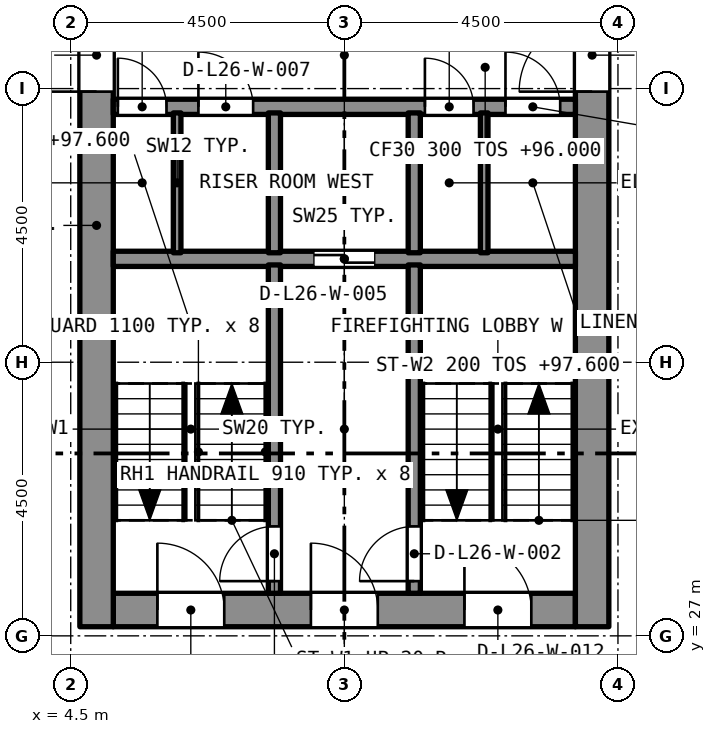
"""IFC4 building model, lengths in metres.
Left out: names, types, materials, properties, quantities, classifications, styles, units other than length and angle.
Written with IfcOpenShell. Run it as: python <this file> out.ifc"""

import sys

from ifc_helpers import new_model, si_unit, direction, frame, frame_2d, origin, place, context, subcontext, project, spatial, rectangle, extrude, element, fill, save


model = new_model("IFC4")
c1 = context("Model", 3, precision=1e-05, world=origin(), true_north=direction((0.0, 1.0)))
c2 = subcontext(c1, "Body", "Model", "MODEL_VIEW")
j1 = project(units=[si_unit("LENGTHUNIT", "METRE"), si_unit("PLANEANGLEUNIT", "RADIAN")], contexts=[c1])
p1 = place(None, origin())
s1 = spatial("IfcSite", under=j1, at=p1, CompositionType="ELEMENT")
p2 = place(p1, origin())
s2 = spatial("IfcBuilding", under=s1, at=p2, CompositionType="ELEMENT")
p3 = place(p2, frame((0.0, 0.0, 96.0)))
s3 = spatial("IfcBuildingStorey", under=s2, at=p3, CompositionType="ELEMENT", Elevation=96.0)
p4 = place(p3, frame((5.2, 27.425, 0.0), z_axis=(0.0, 0.0, 1.0), x_axis=(1.0, 0.0, 0.0)))
e1 = element("IfcWall", 1, at=p4, inside=s3, PredefinedType="SOLIDWALL", context=c2, shape_type="SweptSolid", body=[
    extrude(rectangle(XDim=7.6, YDim=0.55, at=frame_2d((3.8, 0.0))), origin(), (0.0, 0.0, 1.0), 3.2),
])
p5 = place(p4, frame((0.725, 0.0, 0.0)))
e2 = element("IfcOpeningElement", 2, at=p5, cuts=e1, PredefinedType="OPENING", context=c2, shape_type="SweptSolid", body=[
    extrude(rectangle(XDim=1.1, YDim=2.1, at=frame_2d((0.55, 1.05))), frame((0.0, 0.285, 0.0), z_axis=(0.0, -1.0, 0.0), x_axis=(1.0, 0.0, 0.0)), (0.0, 0.0, 1.0), 0.57),
])
p6 = place(p4, frame((3.25, 0.0, 0.0)))
e3 = element("IfcOpeningElement", 3, at=p6, cuts=e1, PredefinedType="OPENING", context=c2, shape_type="SweptSolid", body=[
    extrude(rectangle(XDim=1.1, YDim=2.1, at=frame_2d((0.55, 1.05))), frame((0.0, 0.285, 0.0), z_axis=(0.0, -1.0, 0.0), x_axis=(1.0, 0.0, 0.0)), (0.0, 0.0, 1.0), 0.57),
])
p7 = place(p4, frame((5.775, 0.0, 0.0)))
e4 = element("IfcOpeningElement", 4, at=p7, cuts=e1, PredefinedType="OPENING", context=c2, shape_type="SweptSolid", body=[
    extrude(rectangle(XDim=1.1, YDim=2.1, at=frame_2d((0.55, 1.05))), frame((0.0, 0.285, 0.0), z_axis=(0.0, -1.0, 0.0), x_axis=(1.0, 0.0, 0.0)), (0.0, 0.0, 1.0), 0.57),
])
p8 = place(p3, frame((4.925, 27.15, 0.0), z_axis=(0.0, 0.0, 1.0), x_axis=(0.0, 1.0, 0.0)))
e5 = element("IfcWall", 5, at=p8, inside=s3, PredefinedType="SOLIDWALL", context=c2, shape_type="SweptSolid", body=[
    extrude(rectangle(XDim=13.2, YDim=0.55, at=frame_2d((6.6, 0.0))), origin(), (0.0, 0.0, 1.0), 3.2),
])
p9 = place(p8, frame((8.8, 0.0, 0.0)))
e6 = element("IfcOpeningElement", 6, at=p9, cuts=e5, PredefinedType="OPENING", context=c2, shape_type="SweptSolid", body=[
    extrude(rectangle(XDim=1.2, YDim=2.1, at=frame_2d((0.6, 1.05))), frame((0.0, 0.285, 0.0), z_axis=(0.0, -1.0, 0.0), x_axis=(1.0, 0.0, 0.0)), (0.0, 0.0, 1.0), 0.57),
])
p10 = place(p3, frame((13.075, 27.15, 0.0), z_axis=(0.0, 0.0, 1.0), x_axis=(0.0, 1.0, 0.0)))
e7 = element("IfcWall", 7, at=p10, inside=s3, PredefinedType="SOLIDWALL", context=c2, shape_type="SweptSolid", body=[
    extrude(rectangle(XDim=13.2, YDim=0.55, at=frame_2d((6.6, 0.0))), origin(), (0.0, 0.0, 1.0), 3.2),
])
p11 = place(p10, frame((10.95, 0.0, 0.0)))
e8 = element("IfcOpeningElement", 8, at=p11, cuts=e7, PredefinedType="OPENING", context=c2, shape_type="SweptSolid", body=[
    extrude(rectangle(XDim=1.1, YDim=2.1, at=frame_2d((0.55, 1.05))), frame((0.0, 0.285, 0.0), z_axis=(0.0, -1.0, 0.0), x_axis=(1.0, 0.0, 0.0)), (0.0, 0.0, 1.0), 0.57),
])
p12 = place(p10, frame((8.8, 0.0, 0.0)))
e9 = element("IfcOpeningElement", 9, at=p12, cuts=e7, PredefinedType="OPENING", context=c2, shape_type="SweptSolid", body=[
    extrude(rectangle(XDim=1.2, YDim=2.1, at=frame_2d((0.6, 1.05))), frame((0.0, 0.285, 0.0), z_axis=(0.0, -1.0, 0.0), x_axis=(1.0, 0.0, 0.0)), (0.0, 0.0, 1.0), 0.57),
])
p13 = place(p3, frame((5.2, 33.2, 0.0), z_axis=(0.0, 0.0, 1.0), x_axis=(1.0, 0.0, 0.0)))
e10 = element("IfcWall", 10, at=p13, inside=s3, PredefinedType="SOLIDWALL", context=c2, shape_type="SweptSolid", body=[
    extrude(rectangle(XDim=7.6, YDim=0.25, at=frame_2d((3.8, 0.0))), origin(), (0.0, 0.0, 1.0), 2.9),
])
p14 = place(p13, frame((3.3, 0.0, 0.0)))
e11 = element("IfcOpeningElement", 11, at=p14, cuts=e10, PredefinedType="OPENING", context=c2, shape_type="SweptSolid", body=[
    extrude(rectangle(XDim=1.0, YDim=2.1, at=frame_2d((0.5, 1.05))), frame((0.0, 0.135, 0.0), z_axis=(0.0, -1.0, 0.0), x_axis=(1.0, 0.0, 0.0)), (0.0, 0.0, 1.0), 0.27),
])
p15 = place(p3, frame((5.2, 35.7, 0.0), z_axis=(0.0, 0.0, 1.0), x_axis=(1.0, 0.0, 0.0)))
e12 = element("IfcWall", 12, at=p15, inside=s3, PredefinedType="SOLIDWALL", context=c2, shape_type="SweptSolid", body=[
    extrude(rectangle(XDim=7.6, YDim=0.25, at=frame_2d((3.8, 0.0))), origin(), (0.0, 0.0, 1.0), 2.9),
])
p16 = place(p15, frame((0.075, 0.0, 0.0)))
e13 = element("IfcOpeningElement", 13, at=p16, cuts=e12, PredefinedType="OPENING", context=c2, shape_type="SweptSolid", body=[
    extrude(rectangle(XDim=0.8, YDim=2.1, at=frame_2d((0.4, 1.05))), frame((0.0, 0.135, 0.0), z_axis=(0.0, -1.0, 0.0), x_axis=(1.0, 0.0, 0.0)), (0.0, 0.0, 1.0), 0.27),
])
p17 = place(p15, frame((1.4, 0.0, 0.0)))
e14 = element("IfcOpeningElement", 14, at=p17, cuts=e12, PredefinedType="OPENING", context=c2, shape_type="SweptSolid", body=[
    extrude(rectangle(XDim=0.9, YDim=2.1, at=frame_2d((0.45, 1.05))), frame((0.0, 0.135, 0.0), z_axis=(0.0, -1.0, 0.0), x_axis=(1.0, 0.0, 0.0)), (0.0, 0.0, 1.0), 0.27),
])
p18 = place(p15, frame((5.125, 0.0, 0.0)))
e15 = element("IfcOpeningElement", 15, at=p18, cuts=e12, PredefinedType="OPENING", context=c2, shape_type="SweptSolid", body=[
    extrude(rectangle(XDim=0.8, YDim=2.1, at=frame_2d((0.4, 1.05))), frame((0.0, 0.135, 0.0), z_axis=(0.0, -1.0, 0.0), x_axis=(1.0, 0.0, 0.0)), (0.0, 0.0, 1.0), 0.27),
])
p19 = place(p15, frame((6.45, 0.0, 0.0)))
e16 = element("IfcOpeningElement", 16, at=p19, cuts=e12, PredefinedType="OPENING", context=c2, shape_type="SweptSolid", body=[
    extrude(rectangle(XDim=0.9, YDim=2.1, at=frame_2d((0.45, 1.05))), frame((0.0, 0.135, 0.0), z_axis=(0.0, -1.0, 0.0), x_axis=(1.0, 0.0, 0.0)), (0.0, 0.0, 1.0), 0.27),
])
p20 = place(p3, frame((7.85, 27.7, 0.0), z_axis=(0.0, 0.0, 1.0), x_axis=(0.0, 1.0, 0.0)))
e17 = element("IfcWall", 17, at=p20, inside=s3, PredefinedType="SOLIDWALL", context=c2, shape_type="SweptSolid", body=[
    extrude(rectangle(XDim=5.4, YDim=0.2, at=frame_2d((2.7, 0.0))), origin(), (0.0, 0.0, 1.0), 2.9),
])
p21 = place(p20, frame((0.2, 0.0, 0.0)))
e18 = element("IfcOpeningElement", 18, at=p21, cuts=e17, PredefinedType="OPENING", context=c2, shape_type="SweptSolid", body=[
    extrude(rectangle(XDim=0.9, YDim=2.1, at=frame_2d((0.45, 1.05))), frame((0.0, 0.11, 0.0), z_axis=(0.0, -1.0, 0.0), x_axis=(1.0, 0.0, 0.0)), (0.0, 0.0, 1.0), 0.22),
])
p22 = place(p3, frame((10.15, 27.7, 0.0), z_axis=(0.0, 0.0, 1.0), x_axis=(0.0, 1.0, 0.0)))
e19 = element("IfcWall", 19, at=p22, inside=s3, PredefinedType="SOLIDWALL", context=c2, shape_type="SweptSolid", body=[
    extrude(rectangle(XDim=5.4, YDim=0.2, at=frame_2d((2.7, 0.0))), origin(), (0.0, 0.0, 1.0), 2.9),
])
p23 = place(p22, frame((0.2, 0.0, 0.0)))
e20 = element("IfcOpeningElement", 20, at=p23, cuts=e19, PredefinedType="OPENING", context=c2, shape_type="SweptSolid", body=[
    extrude(rectangle(XDim=0.9, YDim=2.1, at=frame_2d((0.45, 1.05))), frame((0.0, 0.11, 0.0), z_axis=(0.0, -1.0, 0.0), x_axis=(1.0, 0.0, 0.0)), (0.0, 0.0, 1.0), 0.22),
])
for number, where, z_axis, x_axis in (
    (21, (7.85, 33.3, 0.0), (0.0, 0.0, 1.0), (0.0, 1.0, 0.0)),
    (22, (10.15, 33.3, 0.0), (0.0, 0.0, 1.0), (0.0, 1.0, 0.0)),
):
    element("IfcWall", number, at=place(p3, frame(where, z_axis=z_axis, x_axis=x_axis)), inside=s3, PredefinedType="SOLIDWALL", context=c2, shape_type="SweptSolid", body=[
        extrude(rectangle(XDim=2.3, YDim=0.2, at=frame_2d((1.15, 0.0))), origin(), (0.0, 0.0, 1.0), 2.9),
    ])
for number, where, z_axis, x_axis in (
    (23, (6.25, 33.3, 0.0), (0.0, 0.0, 1.0), (0.0, 1.0, 0.0)),
    (24, (11.3, 33.3, 0.0), (0.0, 0.0, 1.0), (0.0, 1.0, 0.0)),
):
    element("IfcWall", number, at=place(p3, frame(where, z_axis=z_axis, x_axis=x_axis)), inside=s3, PredefinedType="PARTITIONING", context=c2, shape_type="SweptSolid", body=[
        extrude(rectangle(XDim=2.3, YDim=0.125, at=frame_2d((1.15, 0.0))), origin(), (0.0, 0.0, 1.0), 2.9),
    ])
p24 = place(p21, origin())
e25 = element("IfcDoor", 25, at=p24, inside=s3, OperationType="SINGLE_SWING_LEFT", PredefinedType="DOOR", context=c2, shape_type="SweptSolid", body=[
    extrude(rectangle(XDim=0.9, YDim=2.1, at=frame_2d((0.45, 1.05))), frame((0.0, 0.025, 0.0), z_axis=(0.0, -1.0, 0.0), x_axis=(1.0, 0.0, 0.0)), (0.0, 0.0, 1.0), 0.05),
])
fill(e18, e25)
p25 = place(p23, origin())
e26 = element("IfcDoor", 26, at=p25, inside=s3, OperationType="SINGLE_SWING_LEFT", PredefinedType="DOOR", context=c2, shape_type="SweptSolid", body=[
    extrude(rectangle(XDim=0.9, YDim=2.1, at=frame_2d((0.45, 1.05))), frame((0.0, 0.025, 0.0), z_axis=(0.0, -1.0, 0.0), x_axis=(1.0, 0.0, 0.0)), (0.0, 0.0, 1.0), 0.05),
])
fill(e20, e26)
p26 = place(p14, origin())
e27 = element("IfcDoor", 27, at=p26, inside=s3, OperationType="SLIDING_TO_LEFT", PredefinedType="DOOR", context=c2, shape_type="SweptSolid", body=[
    extrude(rectangle(XDim=1.0, YDim=2.1, at=frame_2d((0.5, 1.05))), frame((0.0, 0.025, 0.0), z_axis=(0.0, -1.0, 0.0), x_axis=(1.0, 0.0, 0.0)), (0.0, 0.0, 1.0), 0.05),
])
fill(e11, e27)
p27 = place(p16, origin())
e28 = element("IfcDoor", 28, at=p27, inside=s3, OperationType="SINGLE_SWING_LEFT", PredefinedType="DOOR", context=c2, shape_type="SweptSolid", body=[
    extrude(rectangle(XDim=0.8, YDim=2.1, at=frame_2d((0.4, 1.05))), frame((0.0, 0.025, 0.0), z_axis=(0.0, -1.0, 0.0), x_axis=(1.0, 0.0, 0.0)), (0.0, 0.0, 1.0), 0.05),
])
fill(e13, e28)
p28 = place(p17, origin())
e29 = element("IfcDoor", 29, at=p28, inside=s3, OperationType="SINGLE_SWING_LEFT", PredefinedType="DOOR", context=c2, shape_type="SweptSolid", body=[
    extrude(rectangle(XDim=0.9, YDim=2.1, at=frame_2d((0.45, 1.05))), frame((0.0, 0.025, 0.0), z_axis=(0.0, -1.0, 0.0), x_axis=(1.0, 0.0, 0.0)), (0.0, 0.0, 1.0), 0.05),
])
fill(e14, e29)
p29 = place(p18, origin())
e30 = element("IfcDoor", 30, at=p29, inside=s3, OperationType="SINGLE_SWING_LEFT", PredefinedType="DOOR", context=c2, shape_type="SweptSolid", body=[
    extrude(rectangle(XDim=0.8, YDim=2.1, at=frame_2d((0.4, 1.05))), frame((0.0, 0.025, 0.0), z_axis=(0.0, -1.0, 0.0), x_axis=(1.0, 0.0, 0.0)), (0.0, 0.0, 1.0), 0.05),
])
fill(e15, e30)
p30 = place(p19, origin())
e31 = element("IfcDoor", 31, at=p30, inside=s3, OperationType="SINGLE_SWING_LEFT", PredefinedType="DOOR", context=c2, shape_type="SweptSolid", body=[
    extrude(rectangle(XDim=0.9, YDim=2.1, at=frame_2d((0.45, 1.05))), frame((0.0, 0.025, 0.0), z_axis=(0.0, -1.0, 0.0), x_axis=(1.0, 0.0, 0.0)), (0.0, 0.0, 1.0), 0.05),
])
fill(e16, e31)
p31 = place(p5, origin())
e32 = element("IfcDoor", 32, at=p31, inside=s3, OperationType="SINGLE_SWING_LEFT", PredefinedType="DOOR", context=c2, shape_type="SweptSolid", body=[
    extrude(rectangle(XDim=1.1, YDim=2.1, at=frame_2d((0.55, 1.05))), frame((0.0, 0.025, 0.0), z_axis=(0.0, -1.0, 0.0), x_axis=(1.0, 0.0, 0.0)), (0.0, 0.0, 1.0), 0.05),
])
fill(e2, e32)
p32 = place(p6, origin())
e33 = element("IfcDoor", 33, at=p32, inside=s3, OperationType="SINGLE_SWING_LEFT", PredefinedType="DOOR", context=c2, shape_type="SweptSolid", body=[
    extrude(rectangle(XDim=1.1, YDim=2.1, at=frame_2d((0.55, 1.05))), frame((0.0, 0.025, 0.0), z_axis=(0.0, -1.0, 0.0), x_axis=(1.0, 0.0, 0.0)), (0.0, 0.0, 1.0), 0.05),
])
fill(e3, e33)
p33 = place(p7, origin())
e34 = element("IfcDoor", 34, at=p33, inside=s3, OperationType="SINGLE_SWING_LEFT", PredefinedType="DOOR", context=c2, shape_type="SweptSolid", body=[
    extrude(rectangle(XDim=1.1, YDim=2.1, at=frame_2d((0.55, 1.05))), frame((0.0, 0.025, 0.0), z_axis=(0.0, -1.0, 0.0), x_axis=(1.0, 0.0, 0.0)), (0.0, 0.0, 1.0), 0.05),
])
fill(e4, e34)
p34 = place(p9, origin())
e35 = element("IfcDoor", 35, at=p34, inside=s3, OperationType="SINGLE_SWING_LEFT", PredefinedType="DOOR", context=c2, shape_type="SweptSolid", body=[
    extrude(rectangle(XDim=1.2, YDim=2.1, at=frame_2d((0.6, 1.05))), frame((0.0, 0.025, 0.0), z_axis=(0.0, -1.0, 0.0), x_axis=(1.0, 0.0, 0.0)), (0.0, 0.0, 1.0), 0.05),
])
fill(e6, e35)
p35 = place(p12, origin())
e36 = element("IfcDoor", 36, at=p35, inside=s3, OperationType="SINGLE_SWING_LEFT", PredefinedType="DOOR", context=c2, shape_type="SweptSolid", body=[
    extrude(rectangle(XDim=1.2, YDim=2.1, at=frame_2d((0.6, 1.05))), frame((0.0, 0.025, 0.0), z_axis=(0.0, -1.0, 0.0), x_axis=(1.0, 0.0, 0.0)), (0.0, 0.0, 1.0), 0.05),
])
fill(e9, e36)
save(model, sys.argv[1])
